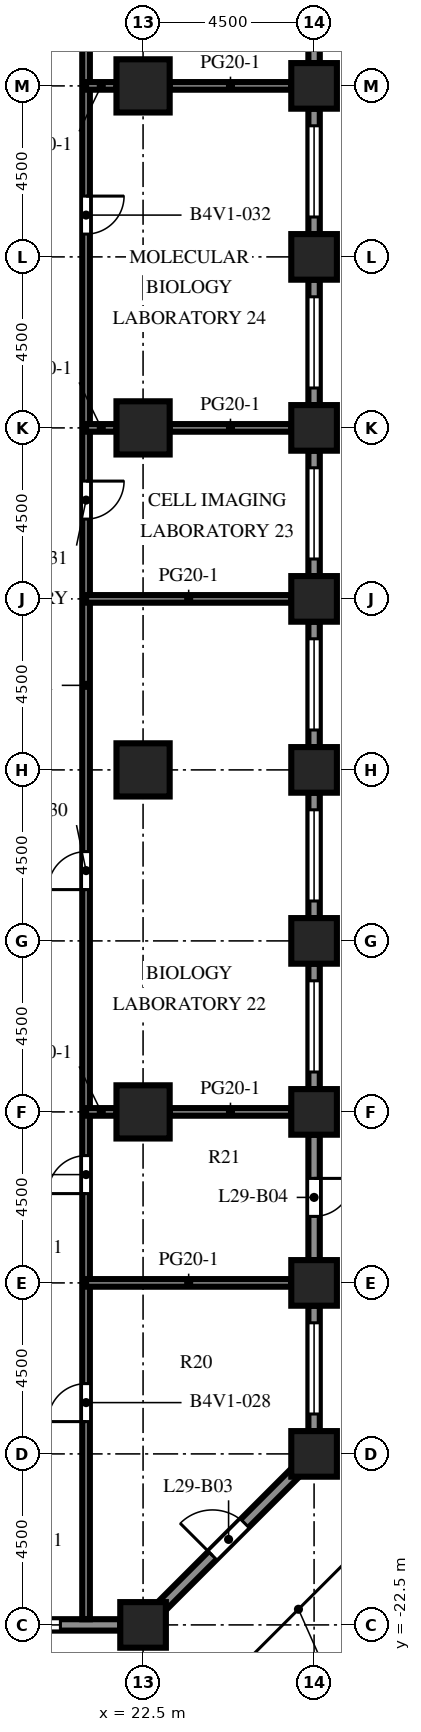
"""IFC4 building model, lengths in metres.
Left out: names, types, materials, properties, quantities, classifications, styles, units other than length and angle.
Written with IfcOpenShell. Run it as: python <this file> out.ifc"""

import sys

from ifc_helpers import new_model, si_unit, direction, frame, frame_2d, origin, origin_2d, place, context, subcontext, project, spatial, rectangle, extrude, element, fill, save


model = new_model("IFC4")
c1 = context("Model", 3, precision=1e-05, world=origin(), true_north=direction((0.0, 1.0)))
c2 = subcontext(c1, "Body", "Model", "MODEL_VIEW")
j1 = project(units=[si_unit("LENGTHUNIT", "METRE"), si_unit("PLANEANGLEUNIT", "RADIAN")], contexts=[c1])
p1 = place(None, origin())
s1 = spatial("IfcSite", under=j1, at=p1, CompositionType="ELEMENT")
p2 = place(p1, origin())
s2 = spatial("IfcBuilding", under=s1, at=p2, CompositionType="ELEMENT")
p3 = place(p2, frame((0.0, 0.0, 129.0)))
s3 = spatial("IfcBuildingStorey", under=s2, at=p3, CompositionType="ELEMENT", Elevation=129.0)
for number, where, z_axis, x_axis in (
    (1, (22.5, -22.5, 0.0), (0.0, 0.0, 1.0), (1.0, 0.0, 0.0)),
    (2, (27.0, -18.0, 0.0), (0.0, 0.0, 1.0), (1.0, 0.0, 0.0)),
    (3, (27.0, -13.5, 0.0), (0.0, 0.0, 1.0), (1.0, 0.0, 0.0)),
    (4, (27.0, -9.0, 0.0), (0.0, 0.0, 1.0), (1.0, 0.0, 0.0)),
    (5, (27.0, -4.5, 0.0), (0.0, 0.0, 1.0), (1.0, 0.0, 0.0)),
    (6, (27.0, 0.0, 0.0), (0.0, 0.0, 1.0), (1.0, 0.0, 0.0)),
    (7, (27.0, 4.5, 0.0), (0.0, 0.0, 1.0), (1.0, 0.0, 0.0)),
    (8, (27.0, 9.0, 0.0), (0.0, 0.0, 1.0), (1.0, 0.0, 0.0)),
    (9, (27.0, 13.5, 0.0), (0.0, 0.0, 1.0), (1.0, 0.0, 0.0)),
    (10, (27.0, 18.0, 0.0), (0.0, 0.0, 1.0), (1.0, 0.0, 0.0)),
):
    element("IfcColumn", number, at=place(p3, frame(where, z_axis=z_axis, x_axis=x_axis)), inside=s3, PredefinedType="COLUMN", context=c2, shape_type="SweptSolid", body=[
        extrude(rectangle(XDim=1.2, YDim=1.2, at=origin_2d()), origin(), (0.0, 0.0, 1.0), 4.1),
    ])
for number, where, z_axis, x_axis in (
    (11, (22.5, -9.0, 0.0), (0.0, 0.0, 1.0), (1.0, 0.0, 0.0)),
    (12, (22.5, 0.0, 0.0), (0.0, 0.0, 1.0), (1.0, 0.0, 0.0)),
    (13, (22.5, 9.0, 0.0), (0.0, 0.0, 1.0), (1.0, 0.0, 0.0)),
    (14, (22.5, 18.0, 0.0), (0.0, 0.0, 1.0), (1.0, 0.0, 0.0)),
):
    element("IfcColumn", number, at=place(p3, frame(where, z_axis=z_axis, x_axis=x_axis)), inside=s3, PredefinedType="COLUMN", context=c2, shape_type="SweptSolid", body=[
        extrude(rectangle(XDim=1.4, YDim=1.4, at=origin_2d()), origin(), (0.0, 0.0, 1.0), 4.1),
    ])
p4 = place(p3, frame((21.9, -22.5, 0.0), z_axis=(0.0, 0.0, 1.0), x_axis=(-1.0, 0.0, 0.0)))
e15 = element("IfcWall", 15, at=p4, inside=s3, PredefinedType="SOLIDWALL", context=c2, shape_type="SweptSolid", body=[
    extrude(rectangle(XDim=3.3, YDim=0.3, at=frame_2d((1.65, 0.0))), origin(), (0.0, 0.0, 1.0), 2.75),
])
p5 = place(p4, frame((1.575, 0.0, 0.8)))
e16 = element("IfcOpeningElement", 16, at=p5, cuts=e15, PredefinedType="OPENING", context=c2, shape_type="SweptSolid", body=[
    extrude(rectangle(XDim=1.2, YDim=1.7, at=frame_2d((0.6, 0.85))), frame((0.0, 0.16, 0.0), z_axis=(0.0, -1.0, 0.0), x_axis=(1.0, 0.0, 0.0)), (0.0, 0.0, 1.0), 0.32),
])
p6 = place(p3, frame((26.506, -18.494, 0.0), z_axis=(0.0, 0.0, 1.0), x_axis=(-0.707106781187, -0.707106781187, 0.0)))
e17 = element("IfcWall", 17, at=p6, inside=s3, PredefinedType="SOLIDWALL", context=c2, shape_type="SweptSolid", body=[
    extrude(rectangle(XDim=4.967, YDim=0.3, at=frame_2d((2.483, 0.0))), origin(), (0.0, 0.0, 1.0), 2.75),
])
p7 = place(p6, frame((1.884, 0.0, 0.0)))
e18 = element("IfcOpeningElement", 18, at=p7, cuts=e17, PredefinedType="OPENING", context=c2, shape_type="SweptSolid", body=[
    extrude(rectangle(XDim=1.2, YDim=2.2, at=frame_2d((0.6, 1.1))), frame((0.0, 0.16, 0.0), z_axis=(0.0, -1.0, 0.0), x_axis=(1.0, 0.0, 0.0)), (0.0, 0.0, 1.0), 0.32),
])
p8 = place(p3, frame((27.0, -14.1, 0.0), z_axis=(0.0, 0.0, 1.0), x_axis=(0.0, -1.0, 0.0)))
e19 = element("IfcWall", 19, at=p8, inside=s3, PredefinedType="SOLIDWALL", context=c2, shape_type="SweptSolid", body=[
    extrude(rectangle(XDim=3.3, YDim=0.3, at=frame_2d((1.65, 0.0))), origin(), (0.0, 0.0, 1.0), 2.75),
])
p9 = place(p8, frame((0.45, 0.0, 0.8)))
e20 = element("IfcOpeningElement", 20, at=p9, cuts=e19, PredefinedType="OPENING", context=c2, shape_type="SweptSolid", body=[
    extrude(rectangle(XDim=2.4, YDim=1.7, at=frame_2d((1.2, 0.85))), frame((0.0, 0.16, 0.0), z_axis=(0.0, -1.0, 0.0), x_axis=(1.0, 0.0, 0.0)), (0.0, 0.0, 1.0), 0.32),
])
p10 = place(p3, frame((27.0, -9.6, 0.0), z_axis=(0.0, 0.0, 1.0), x_axis=(0.0, -1.0, 0.0)))
e21 = element("IfcWall", 21, at=p10, inside=s3, PredefinedType="SOLIDWALL", context=c2, shape_type="SweptSolid", body=[
    extrude(rectangle(XDim=3.3, YDim=0.3, at=frame_2d((1.65, 0.0))), origin(), (0.0, 0.0, 1.0), 2.75),
])
p11 = place(p10, frame((1.15, 0.0, 0.0)))
e22 = element("IfcOpeningElement", 22, at=p11, cuts=e21, PredefinedType="OPENING", context=c2, shape_type="SweptSolid", body=[
    extrude(rectangle(XDim=1.0, YDim=2.2, at=frame_2d((0.5, 1.1))), frame((0.0, 0.16, 0.0), z_axis=(0.0, -1.0, 0.0), x_axis=(1.0, 0.0, 0.0)), (0.0, 0.0, 1.0), 0.32),
])
p12 = place(p3, frame((27.0, -5.1, 0.0), z_axis=(0.0, 0.0, 1.0), x_axis=(0.0, -1.0, 0.0)))
e23 = element("IfcWall", 23, at=p12, inside=s3, PredefinedType="SOLIDWALL", context=c2, shape_type="SweptSolid", body=[
    extrude(rectangle(XDim=3.3, YDim=0.3, at=frame_2d((1.65, 0.0))), origin(), (0.0, 0.0, 1.0), 2.75),
])
p13 = place(p12, frame((0.45, 0.0, 0.8)))
e24 = element("IfcOpeningElement", 24, at=p13, cuts=e23, PredefinedType="OPENING", context=c2, shape_type="SweptSolid", body=[
    extrude(rectangle(XDim=2.4, YDim=1.7, at=frame_2d((1.2, 0.85))), frame((0.0, 0.16, 0.0), z_axis=(0.0, -1.0, 0.0), x_axis=(1.0, 0.0, 0.0)), (0.0, 0.0, 1.0), 0.32),
])
p14 = place(p3, frame((27.0, -0.6, 0.0), z_axis=(0.0, 0.0, 1.0), x_axis=(0.0, -1.0, 0.0)))
e25 = element("IfcWall", 25, at=p14, inside=s3, PredefinedType="SOLIDWALL", context=c2, shape_type="SweptSolid", body=[
    extrude(rectangle(XDim=3.3, YDim=0.3, at=frame_2d((1.65, 0.0))), origin(), (0.0, 0.0, 1.0), 2.75),
])
p15 = place(p14, frame((0.45, 0.0, 0.8)))
e26 = element("IfcOpeningElement", 26, at=p15, cuts=e25, PredefinedType="OPENING", context=c2, shape_type="SweptSolid", body=[
    extrude(rectangle(XDim=2.4, YDim=1.7, at=frame_2d((1.2, 0.85))), frame((0.0, 0.16, 0.0), z_axis=(0.0, -1.0, 0.0), x_axis=(1.0, 0.0, 0.0)), (0.0, 0.0, 1.0), 0.32),
])
p16 = place(p3, frame((27.0, 3.9, 0.0), z_axis=(0.0, 0.0, 1.0), x_axis=(0.0, -1.0, 0.0)))
e27 = element("IfcWall", 27, at=p16, inside=s3, PredefinedType="SOLIDWALL", context=c2, shape_type="SweptSolid", body=[
    extrude(rectangle(XDim=3.3, YDim=0.3, at=frame_2d((1.65, 0.0))), origin(), (0.0, 0.0, 1.0), 2.75),
])
p17 = place(p16, frame((0.45, 0.0, 0.8)))
e28 = element("IfcOpeningElement", 28, at=p17, cuts=e27, PredefinedType="OPENING", context=c2, shape_type="SweptSolid", body=[
    extrude(rectangle(XDim=2.4, YDim=1.7, at=frame_2d((1.2, 0.85))), frame((0.0, 0.16, 0.0), z_axis=(0.0, -1.0, 0.0), x_axis=(1.0, 0.0, 0.0)), (0.0, 0.0, 1.0), 0.32),
])
p18 = place(p3, frame((27.0, 8.4, 0.0), z_axis=(0.0, 0.0, 1.0), x_axis=(0.0, -1.0, 0.0)))
e29 = element("IfcWall", 29, at=p18, inside=s3, PredefinedType="SOLIDWALL", context=c2, shape_type="SweptSolid", body=[
    extrude(rectangle(XDim=3.3, YDim=0.3, at=frame_2d((1.65, 0.0))), origin(), (0.0, 0.0, 1.0), 2.75),
])
p19 = place(p18, frame((0.45, 0.0, 0.8)))
e30 = element("IfcOpeningElement", 30, at=p19, cuts=e29, PredefinedType="OPENING", context=c2, shape_type="SweptSolid", body=[
    extrude(rectangle(XDim=2.4, YDim=1.7, at=frame_2d((1.2, 0.85))), frame((0.0, 0.16, 0.0), z_axis=(0.0, -1.0, 0.0), x_axis=(1.0, 0.0, 0.0)), (0.0, 0.0, 1.0), 0.32),
])
p20 = place(p3, frame((27.0, 12.9, 0.0), z_axis=(0.0, 0.0, 1.0), x_axis=(0.0, -1.0, 0.0)))
e31 = element("IfcWall", 31, at=p20, inside=s3, PredefinedType="SOLIDWALL", context=c2, shape_type="SweptSolid", body=[
    extrude(rectangle(XDim=3.3, YDim=0.3, at=frame_2d((1.65, 0.0))), origin(), (0.0, 0.0, 1.0), 2.75),
])
p21 = place(p20, frame((0.45, 0.0, 0.8)))
e32 = element("IfcOpeningElement", 32, at=p21, cuts=e31, PredefinedType="OPENING", context=c2, shape_type="SweptSolid", body=[
    extrude(rectangle(XDim=2.4, YDim=1.7, at=frame_2d((1.2, 0.85))), frame((0.0, 0.16, 0.0), z_axis=(0.0, -1.0, 0.0), x_axis=(1.0, 0.0, 0.0)), (0.0, 0.0, 1.0), 0.32),
])
p22 = place(p3, frame((27.0, 17.4, 0.0), z_axis=(0.0, 0.0, 1.0), x_axis=(0.0, -1.0, 0.0)))
e33 = element("IfcWall", 33, at=p22, inside=s3, PredefinedType="SOLIDWALL", context=c2, shape_type="SweptSolid", body=[
    extrude(rectangle(XDim=3.3, YDim=0.3, at=frame_2d((1.65, 0.0))), origin(), (0.0, 0.0, 1.0), 2.75),
])
p23 = place(p22, frame((0.45, 0.0, 0.8)))
e34 = element("IfcOpeningElement", 34, at=p23, cuts=e33, PredefinedType="OPENING", context=c2, shape_type="SweptSolid", body=[
    extrude(rectangle(XDim=2.4, YDim=1.7, at=frame_2d((1.2, 0.85))), frame((0.0, 0.16, 0.0), z_axis=(0.0, -1.0, 0.0), x_axis=(1.0, 0.0, 0.0)), (0.0, 0.0, 1.0), 0.32),
])
p24 = place(p3, frame((27.0, 21.9, 0.0), z_axis=(0.0, 0.0, 1.0), x_axis=(0.0, -1.0, 0.0)))
e35 = element("IfcWall", 35, at=p24, inside=s3, PredefinedType="SOLIDWALL", context=c2, shape_type="SweptSolid", body=[
    extrude(rectangle(XDim=3.3, YDim=0.3, at=frame_2d((1.65, 0.0))), origin(), (0.0, 0.0, 1.0), 2.75),
])
p25 = place(p24, frame((1.15, 0.0, 0.0)))
e36 = element("IfcOpeningElement", 36, at=p25, cuts=e35, PredefinedType="OPENING", context=c2, shape_type="SweptSolid", body=[
    extrude(rectangle(XDim=1.0, YDim=2.2, at=frame_2d((0.5, 1.1))), frame((0.0, 0.16, 0.0), z_axis=(0.0, -1.0, 0.0), x_axis=(1.0, 0.0, 0.0)), (0.0, 0.0, 1.0), 0.32),
])
p26 = place(p3, frame((21.0, 31.35, 0.0), z_axis=(0.0, 0.0, 1.0), x_axis=(0.0, -1.0, 0.0)))
e37 = element("IfcWall", 37, at=p26, inside=s3, PredefinedType="PARTITIONING", context=c2, shape_type="SweptSolid", body=[
    extrude(rectangle(XDim=53.7, YDim=0.2, at=frame_2d((26.85, 0.0))), origin(), (0.0, 0.0, 1.0), 3.65),
])
p27 = place(p26, frame((47.5, 0.0, 0.0)))
e38 = element("IfcOpeningElement", 38, at=p27, cuts=e37, PredefinedType="OPENING", context=c2, shape_type="SweptSolid", body=[
    extrude(rectangle(XDim=1.0, YDim=2.1, at=frame_2d((0.5, 1.05))), frame((0.0, 0.11, 0.0), z_axis=(0.0, -1.0, 0.0), x_axis=(1.0, 0.0, 0.0)), (0.0, 0.0, 1.0), 0.22),
])
p28 = place(p26, frame((41.5, 0.0, 0.0)))
e39 = element("IfcOpeningElement", 39, at=p28, cuts=e37, PredefinedType="OPENING", context=c2, shape_type="SweptSolid", body=[
    extrude(rectangle(XDim=1.0, YDim=2.1, at=frame_2d((0.5, 1.05))), frame((0.0, 0.11, 0.0), z_axis=(0.0, -1.0, 0.0), x_axis=(1.0, 0.0, 0.0)), (0.0, 0.0, 1.0), 0.22),
])
p29 = place(p26, frame((33.5, 0.0, 0.0)))
e40 = element("IfcOpeningElement", 40, at=p29, cuts=e37, PredefinedType="OPENING", context=c2, shape_type="SweptSolid", body=[
    extrude(rectangle(XDim=1.0, YDim=2.1, at=frame_2d((0.5, 1.05))), frame((0.0, 0.11, 0.0), z_axis=(0.0, -1.0, 0.0), x_axis=(1.0, 0.0, 0.0)), (0.0, 0.0, 1.0), 0.22),
])
p30 = place(p26, frame((23.75, 0.0, 0.0)))
e41 = element("IfcOpeningElement", 41, at=p30, cuts=e37, PredefinedType="OPENING", context=c2, shape_type="SweptSolid", body=[
    extrude(rectangle(XDim=1.0, YDim=2.1, at=frame_2d((0.5, 1.05))), frame((0.0, 0.11, 0.0), z_axis=(0.0, -1.0, 0.0), x_axis=(1.0, 0.0, 0.0)), (0.0, 0.0, 1.0), 0.22),
])
p31 = place(p26, frame((16.25, 0.0, 0.0)))
e42 = element("IfcOpeningElement", 42, at=p31, cuts=e37, PredefinedType="OPENING", context=c2, shape_type="SweptSolid", body=[
    extrude(rectangle(XDim=1.0, YDim=2.1, at=frame_2d((0.5, 1.05))), frame((0.0, 0.11, 0.0), z_axis=(0.0, -1.0, 0.0), x_axis=(1.0, 0.0, 0.0)), (0.0, 0.0, 1.0), 0.22),
])
p32 = place(p26, frame((11.0, 0.0, 0.0)))
e43 = element("IfcOpeningElement", 43, at=p32, cuts=e37, PredefinedType="OPENING", context=c2, shape_type="SweptSolid", body=[
    extrude(rectangle(XDim=1.0, YDim=2.1, at=frame_2d((0.5, 1.05))), frame((0.0, 0.11, 0.0), z_axis=(0.0, -1.0, 0.0), x_axis=(1.0, 0.0, 0.0)), (0.0, 0.0, 1.0), 0.22),
])
p33 = place(p26, frame((6.75, 0.0, 0.0)))
e44 = element("IfcOpeningElement", 44, at=p33, cuts=e37, PredefinedType="OPENING", context=c2, shape_type="SweptSolid", body=[
    extrude(rectangle(XDim=1.0, YDim=2.1, at=frame_2d((0.5, 1.05))), frame((0.0, 0.11, 0.0), z_axis=(0.0, -1.0, 0.0), x_axis=(1.0, 0.0, 0.0)), (0.0, 0.0, 1.0), 0.22),
])
p34 = place(p26, frame((2.0, 0.0, 0.0)))
e45 = element("IfcOpeningElement", 45, at=p34, cuts=e37, PredefinedType="OPENING", context=c2, shape_type="SweptSolid", body=[
    extrude(rectangle(XDim=1.0, YDim=2.1, at=frame_2d((0.5, 1.05))), frame((0.0, 0.11, 0.0), z_axis=(0.0, -1.0, 0.0), x_axis=(1.0, 0.0, 0.0)), (0.0, 0.0, 1.0), 0.22),
])
p35 = place(p3, frame((21.0, -13.5, 0.0), z_axis=(0.0, 0.0, 1.0), x_axis=(1.0, 0.0, 0.0)))
e46 = element("IfcWall", 46, at=p35, inside=s3, PredefinedType="PARTITIONING", context=c2, shape_type="SweptSolid", body=[
    extrude(rectangle(XDim=5.4, YDim=0.2, at=frame_2d((2.7, 0.0))), origin(), (0.0, 0.0, 1.0), 3.65),
])
p36 = place(p3, frame((21.0, -9.0, 0.0), z_axis=(0.0, 0.0, 1.0), x_axis=(1.0, 0.0, 0.0)))
e47 = element("IfcWall", 47, at=p36, inside=s3, PredefinedType="PARTITIONING", context=c2, shape_type="SweptSolid", body=[
    extrude(rectangle(XDim=0.8, YDim=0.2, at=frame_2d((0.4, 0.0))), origin(), (0.0, 0.0, 1.0), 3.65),
])
p37 = place(p3, frame((23.2, -9.0, 0.0), z_axis=(0.0, 0.0, 1.0), x_axis=(1.0, 0.0, 0.0)))
e48 = element("IfcWall", 48, at=p37, inside=s3, PredefinedType="PARTITIONING", context=c2, shape_type="SweptSolid", body=[
    extrude(rectangle(XDim=3.2, YDim=0.2, at=frame_2d((1.6, 0.0))), origin(), (0.0, 0.0, 1.0), 3.65),
])
p38 = place(p3, frame((21.0, 4.5, 0.0), z_axis=(0.0, 0.0, 1.0), x_axis=(1.0, 0.0, 0.0)))
e49 = element("IfcWall", 49, at=p38, inside=s3, PredefinedType="PARTITIONING", context=c2, shape_type="SweptSolid", body=[
    extrude(rectangle(XDim=5.4, YDim=0.2, at=frame_2d((2.7, 0.0))), origin(), (0.0, 0.0, 1.0), 3.65),
])
p39 = place(p3, frame((21.0, 9.0, 0.0), z_axis=(0.0, 0.0, 1.0), x_axis=(1.0, 0.0, 0.0)))
e50 = element("IfcWall", 50, at=p39, inside=s3, PredefinedType="PARTITIONING", context=c2, shape_type="SweptSolid", body=[
    extrude(rectangle(XDim=0.8, YDim=0.2, at=frame_2d((0.4, 0.0))), origin(), (0.0, 0.0, 1.0), 3.65),
])
p40 = place(p3, frame((23.2, 9.0, 0.0), z_axis=(0.0, 0.0, 1.0), x_axis=(1.0, 0.0, 0.0)))
e51 = element("IfcWall", 51, at=p40, inside=s3, PredefinedType="PARTITIONING", context=c2, shape_type="SweptSolid", body=[
    extrude(rectangle(XDim=3.2, YDim=0.2, at=frame_2d((1.6, 0.0))), origin(), (0.0, 0.0, 1.0), 3.65),
])
p41 = place(p3, frame((21.0, 18.0, 0.0), z_axis=(0.0, 0.0, 1.0), x_axis=(1.0, 0.0, 0.0)))
e52 = element("IfcWall", 52, at=p41, inside=s3, PredefinedType="PARTITIONING", context=c2, shape_type="SweptSolid", body=[
    extrude(rectangle(XDim=0.8, YDim=0.2, at=frame_2d((0.4, 0.0))), origin(), (0.0, 0.0, 1.0), 3.65),
])
p42 = place(p3, frame((23.2, 18.0, 0.0), z_axis=(0.0, 0.0, 1.0), x_axis=(1.0, 0.0, 0.0)))
e53 = element("IfcWall", 53, at=p42, inside=s3, PredefinedType="PARTITIONING", context=c2, shape_type="SweptSolid", body=[
    extrude(rectangle(XDim=3.2, YDim=0.2, at=frame_2d((1.6, 0.0))), origin(), (0.0, 0.0, 1.0), 3.65),
])
p43 = place(p5, origin())
e54 = element("IfcWindow", 54, at=p43, inside=s3, PartitioningType="SINGLE_PANEL", PredefinedType="WINDOW", context=c2, shape_type="SweptSolid", body=[
    extrude(rectangle(XDim=1.2, YDim=1.7, at=frame_2d((0.6, 0.85))), frame((0.0, 0.03, 0.0), z_axis=(0.0, -1.0, 0.0), x_axis=(1.0, 0.0, 0.0)), (0.0, 0.0, 1.0), 0.06),
])
fill(e16, e54)
p44 = place(p7, origin())
e55 = element("IfcDoor", 55, at=p44, inside=s3, OperationType="SINGLE_SWING_RIGHT", PredefinedType="DOOR", context=c2, shape_type="SweptSolid", body=[
    extrude(rectangle(XDim=1.2, YDim=2.2, at=frame_2d((0.6, 1.1))), frame((0.0, 0.025, 0.0), z_axis=(0.0, -1.0, 0.0), x_axis=(1.0, 0.0, 0.0)), (0.0, 0.0, 1.0), 0.05),
])
fill(e18, e55)
p45 = place(p9, origin())
e56 = element("IfcWindow", 56, at=p45, inside=s3, PartitioningType="SINGLE_PANEL", PredefinedType="WINDOW", context=c2, shape_type="SweptSolid", body=[
    extrude(rectangle(XDim=2.4, YDim=1.7, at=frame_2d((1.2, 0.85))), frame((0.0, 0.03, 0.0), z_axis=(0.0, -1.0, 0.0), x_axis=(1.0, 0.0, 0.0)), (0.0, 0.0, 1.0), 0.06),
])
fill(e20, e56)
p46 = place(p11, origin())
e57 = element("IfcDoor", 57, at=p46, inside=s3, OperationType="SINGLE_SWING_LEFT", PredefinedType="DOOR", context=c2, shape_type="SweptSolid", body=[
    extrude(rectangle(XDim=1.0, YDim=2.2, at=frame_2d((0.5, 1.1))), frame((0.0, 0.025, 0.0), z_axis=(0.0, -1.0, 0.0), x_axis=(1.0, 0.0, 0.0)), (0.0, 0.0, 1.0), 0.05),
])
fill(e22, e57)
p47 = place(p13, origin())
e58 = element("IfcWindow", 58, at=p47, inside=s3, PartitioningType="SINGLE_PANEL", PredefinedType="WINDOW", context=c2, shape_type="SweptSolid", body=[
    extrude(rectangle(XDim=2.4, YDim=1.7, at=frame_2d((1.2, 0.85))), frame((0.0, 0.03, 0.0), z_axis=(0.0, -1.0, 0.0), x_axis=(1.0, 0.0, 0.0)), (0.0, 0.0, 1.0), 0.06),
])
fill(e24, e58)
p48 = place(p15, origin())
e59 = element("IfcWindow", 59, at=p48, inside=s3, PartitioningType="SINGLE_PANEL", PredefinedType="WINDOW", context=c2, shape_type="SweptSolid", body=[
    extrude(rectangle(XDim=2.4, YDim=1.7, at=frame_2d((1.2, 0.85))), frame((0.0, 0.03, 0.0), z_axis=(0.0, -1.0, 0.0), x_axis=(1.0, 0.0, 0.0)), (0.0, 0.0, 1.0), 0.06),
])
fill(e26, e59)
p49 = place(p17, origin())
e60 = element("IfcWindow", 60, at=p49, inside=s3, PartitioningType="SINGLE_PANEL", PredefinedType="WINDOW", context=c2, shape_type="SweptSolid", body=[
    extrude(rectangle(XDim=2.4, YDim=1.7, at=frame_2d((1.2, 0.85))), frame((0.0, 0.03, 0.0), z_axis=(0.0, -1.0, 0.0), x_axis=(1.0, 0.0, 0.0)), (0.0, 0.0, 1.0), 0.06),
])
fill(e28, e60)
p50 = place(p19, origin())
e61 = element("IfcWindow", 61, at=p50, inside=s3, PartitioningType="SINGLE_PANEL", PredefinedType="WINDOW", context=c2, shape_type="SweptSolid", body=[
    extrude(rectangle(XDim=2.4, YDim=1.7, at=frame_2d((1.2, 0.85))), frame((0.0, 0.03, 0.0), z_axis=(0.0, -1.0, 0.0), x_axis=(1.0, 0.0, 0.0)), (0.0, 0.0, 1.0), 0.06),
])
fill(e30, e61)
p51 = place(p21, origin())
e62 = element("IfcWindow", 62, at=p51, inside=s3, PartitioningType="SINGLE_PANEL", PredefinedType="WINDOW", context=c2, shape_type="SweptSolid", body=[
    extrude(rectangle(XDim=2.4, YDim=1.7, at=frame_2d((1.2, 0.85))), frame((0.0, 0.03, 0.0), z_axis=(0.0, -1.0, 0.0), x_axis=(1.0, 0.0, 0.0)), (0.0, 0.0, 1.0), 0.06),
])
fill(e32, e62)
p52 = place(p23, origin())
e63 = element("IfcWindow", 63, at=p52, inside=s3, PartitioningType="SINGLE_PANEL", PredefinedType="WINDOW", context=c2, shape_type="SweptSolid", body=[
    extrude(rectangle(XDim=2.4, YDim=1.7, at=frame_2d((1.2, 0.85))), frame((0.0, 0.03, 0.0), z_axis=(0.0, -1.0, 0.0), x_axis=(1.0, 0.0, 0.0)), (0.0, 0.0, 1.0), 0.06),
])
fill(e34, e63)
p53 = place(p27, origin())
e64 = element("IfcDoor", 64, at=p53, inside=s3, OperationType="SINGLE_SWING_RIGHT", PredefinedType="DOOR", context=c2, shape_type="SweptSolid", body=[
    extrude(rectangle(XDim=1.0, YDim=2.1, at=frame_2d((0.5, 1.05))), frame((0.0, 0.025, 0.0), z_axis=(0.0, -1.0, 0.0), x_axis=(1.0, 0.0, 0.0)), (0.0, 0.0, 1.0), 0.05),
])
fill(e38, e64)
p54 = place(p28, origin())
e65 = element("IfcDoor", 65, at=p54, inside=s3, OperationType="SINGLE_SWING_RIGHT", PredefinedType="DOOR", context=c2, shape_type="SweptSolid", body=[
    extrude(rectangle(XDim=1.0, YDim=2.1, at=frame_2d((0.5, 1.05))), frame((0.0, 0.025, 0.0), z_axis=(0.0, -1.0, 0.0), x_axis=(1.0, 0.0, 0.0)), (0.0, 0.0, 1.0), 0.05),
])
fill(e39, e65)
p55 = place(p29, origin())
e66 = element("IfcDoor", 66, at=p55, inside=s3, OperationType="SINGLE_SWING_RIGHT", PredefinedType="DOOR", context=c2, shape_type="SweptSolid", body=[
    extrude(rectangle(XDim=1.0, YDim=2.1, at=frame_2d((0.5, 1.05))), frame((0.0, 0.025, 0.0), z_axis=(0.0, -1.0, 0.0), x_axis=(1.0, 0.0, 0.0)), (0.0, 0.0, 1.0), 0.05),
])
fill(e40, e66)
p56 = place(p30, origin())
e67 = element("IfcDoor", 67, at=p56, inside=s3, OperationType="SINGLE_SWING_LEFT", PredefinedType="DOOR", context=c2, shape_type="SweptSolid", body=[
    extrude(rectangle(XDim=1.0, YDim=2.1, at=frame_2d((0.5, 1.05))), frame((0.0, 0.025, 0.0), z_axis=(0.0, -1.0, 0.0), x_axis=(1.0, 0.0, 0.0)), (0.0, 0.0, 1.0), 0.05),
])
fill(e41, e67)
p57 = place(p31, origin())
e68 = element("IfcDoor", 68, at=p57, inside=s3, OperationType="SINGLE_SWING_LEFT", PredefinedType="DOOR", context=c2, shape_type="SweptSolid", body=[
    extrude(rectangle(XDim=1.0, YDim=2.1, at=frame_2d((0.5, 1.05))), frame((0.0, 0.025, 0.0), z_axis=(0.0, -1.0, 0.0), x_axis=(1.0, 0.0, 0.0)), (0.0, 0.0, 1.0), 0.05),
])
fill(e42, e68)
save(model, sys.argv[1])
